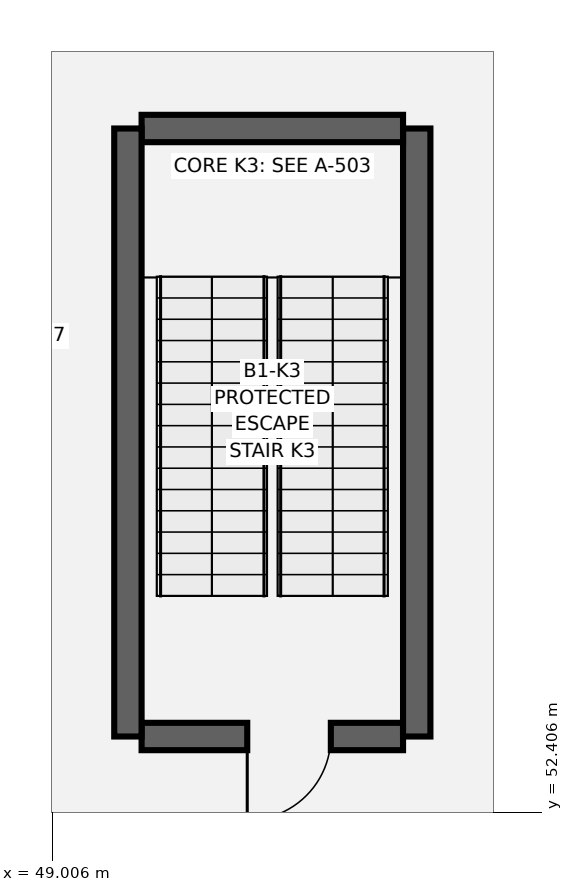
"""IFC4 building model, lengths in metres.
Left out: names, types, materials, properties, quantities, classifications, styles, units other than length and angle.
Written with IfcOpenShell. Run it as: python <this file> out.ifc"""

import sys

from ifc_helpers import new_model, si_unit, direction, frame, frame_2d, origin, place, context, subcontext, project, spatial, rectangle, extrude, element, fill, save


model = new_model("IFC4")
c1 = context("Model", 3, precision=1e-05, world=origin(), true_north=direction((0.0, 1.0)))
c2 = subcontext(c1, "Body", "Model", "MODEL_VIEW")
j1 = project(units=[si_unit("LENGTHUNIT", "METRE"), si_unit("PLANEANGLEUNIT", "RADIAN")], contexts=[c1])
p1 = place(None, origin())
s1 = spatial("IfcSite", under=j1, at=p1, CompositionType="ELEMENT")
p2 = place(p1, origin())
s2 = spatial("IfcBuilding", under=s1, at=p2, CompositionType="ELEMENT")
p3 = place(p2, frame((0.0, 0.0, -4.8)))
s3 = spatial("IfcBuildingStorey", under=s2, at=p3, CompositionType="ELEMENT", Elevation=-4.8)
p4 = place(p3, frame((53.62, 53.4, 0.0), z_axis=(0.0, 0.0, 1.0), x_axis=(-1.0, 0.0, 0.0)))
e1 = element("IfcWall", 1, at=p4, inside=s3, PredefinedType="SHEAR", context=c2, shape_type="SweptSolid", body=[
    extrude(rectangle(XDim=3.44, YDim=0.36, at=frame_2d((1.72, 0.0))), origin(), (0.0, 0.0, 1.0), 4.46),
])
p5 = place(p4, frame((0.95, 0.0, 0.0)))
e2 = element("IfcOpeningElement", 2, at=p5, cuts=e1, PredefinedType="OPENING", context=c2, shape_type="SweptSolid", body=[
    extrude(rectangle(XDim=1.1, YDim=2.15, at=frame_2d((0.55, 1.075))), frame((0.0, 0.19, 0.0), z_axis=(0.0, -1.0, 0.0), x_axis=(1.0, 0.0, 0.0)), (0.0, 0.0, 1.0), 0.38),
])
p6 = place(p3, frame((53.8, 53.4, 0.0), z_axis=(0.0, 0.0, 1.0), x_axis=(0.0, 1.0, 0.0)))
e3 = element("IfcWall", 3, at=p6, inside=s3, PredefinedType="SHEAR", context=c2, shape_type="SweptSolid", body=[
    extrude(rectangle(XDim=8.0, YDim=0.36, at=frame_2d((4.0, 0.0))), origin(), (0.0, 0.0, 1.0), 4.46),
])
p7 = place(p3, frame((53.62, 61.4, 0.0), z_axis=(0.0, 0.0, 1.0), x_axis=(-1.0, 0.0, 0.0)))
e4 = element("IfcWall", 4, at=p7, inside=s3, PredefinedType="SHEAR", context=c2, shape_type="SweptSolid", body=[
    extrude(rectangle(XDim=3.44, YDim=0.36, at=frame_2d((1.72, 0.0))), origin(), (0.0, 0.0, 1.0), 4.46),
])
p8 = place(p3, frame((50.0, 61.4, 0.0), z_axis=(0.0, 0.0, 1.0), x_axis=(0.0, -1.0, 0.0)))
e5 = element("IfcWall", 5, at=p8, inside=s3, PredefinedType="SHEAR", context=c2, shape_type="SweptSolid", body=[
    extrude(rectangle(XDim=8.0, YDim=0.36, at=frame_2d((4.0, 0.0))), origin(), (0.0, 0.0, 1.0), 4.46),
])
p9 = place(p5, origin())
e6 = element("IfcDoor", 6, at=p9, inside=s3, OperationType="SINGLE_SWING_RIGHT", PredefinedType="DOOR", context=c2, shape_type="SweptSolid", body=[
    extrude(rectangle(XDim=1.1, YDim=2.15, at=frame_2d((0.55, 1.075))), frame((0.0, 0.025, 0.0), z_axis=(0.0, -1.0, 0.0), x_axis=(1.0, 0.0, 0.0)), (0.0, 0.0, 1.0), 0.05),
])
fill(e2, e6)
save(model, sys.argv[1])
